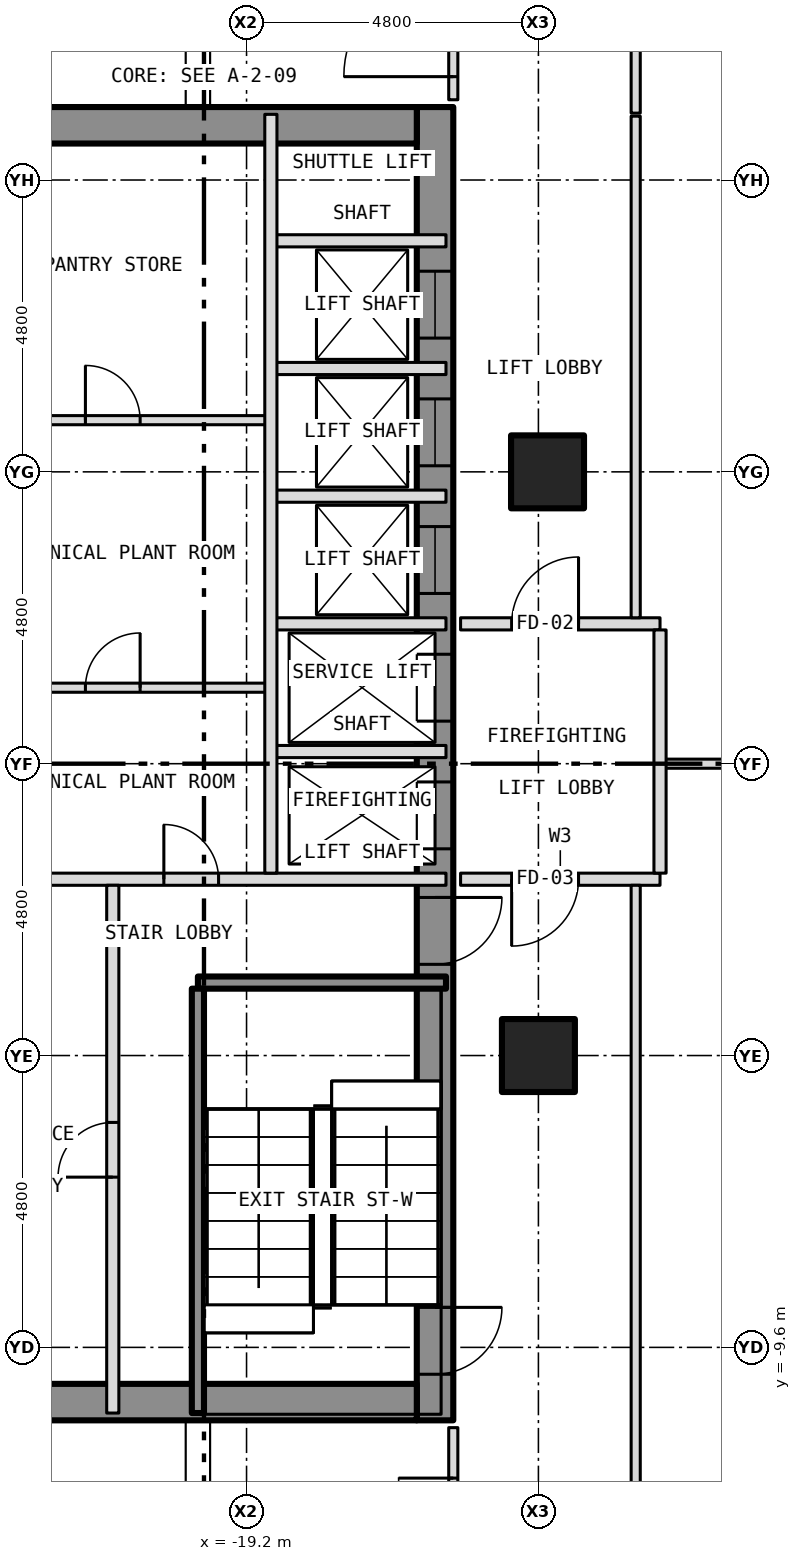
"""IFC4 building model, lengths in metres.
Left out: names, types, materials, properties, quantities, classifications, styles, units other than length and angle.
Written with IfcOpenShell. Run it as: python <this file> out.ifc"""

import sys

from ifc_helpers import new_model, si_unit, direction, frame, frame_2d, origin, origin_2d, place, context, subcontext, project, spatial, rectangle, hollow_rectangle, extrude, element, fill, save


model = new_model("IFC4")
c1 = context("Model", 3, precision=1e-05, world=origin(), true_north=direction((0.0, 1.0)))
c2 = subcontext(c1, "Body", "Model", "MODEL_VIEW")
j1 = project(units=[si_unit("LENGTHUNIT", "METRE"), si_unit("PLANEANGLEUNIT", "RADIAN")], contexts=[c1])
p1 = place(None, origin())
s1 = spatial("IfcSite", under=j1, at=p1, CompositionType="ELEMENT")
p2 = place(p1, origin())
s2 = spatial("IfcBuilding", under=s1, at=p2, CompositionType="ELEMENT")
p3 = place(p2, frame((0.0, 0.0, 33.5)))
s3 = spatial("IfcBuildingStorey", under=s2, at=p3, CompositionType="ELEMENT", Elevation=33.5)
for number, where, z_axis, x_axis in (
    (1, (-14.4, -4.8, -0.3), (0.0, 0.0, 1.0), (1.0, 0.0, 0.0)),
    (2, (-14.25, 4.8, -0.3), (0.0, 0.0, 1.0), (1.0, 0.0, 0.0)),
):
    element("IfcColumn", number, at=place(p3, frame(where, z_axis=z_axis, x_axis=x_axis)), inside=s3, PredefinedType="COLUMN", context=c2, shape_type="SweptSolid", body=[
        extrude(hollow_rectangle(XDim=1.2, YDim=1.2, WallThickness=0.07, at=origin_2d()), origin(), (0.0, 0.0, 1.0), 5.65),
    ])
p4 = place(p3, frame((-16.1, -10.8, 0.0), z_axis=(0.0, 0.0, 1.0), x_axis=(0.0, 1.0, 0.0)))
e3 = element("IfcWall", 3, at=p4, inside=s3, PredefinedType="SHEAR", context=c2, shape_type="SweptSolid", body=[
    extrude(rectangle(XDim=21.6, YDim=0.6, at=frame_2d((10.8, 0.0))), origin(), (0.0, 0.0, 1.0), 4.9),
])
p5 = place(p4, frame((9.4, 0.0, 0.0)))
e4 = element("IfcOpeningElement", 4, at=p5, cuts=e3, PredefinedType="OPENING", context=c2, shape_type="SweptSolid", body=[
    extrude(rectangle(XDim=1.1, YDim=2.1, at=frame_2d((0.55, 1.05))), frame((0.0, 0.312, 0.0), z_axis=(0.0, -1.0, 0.0), x_axis=(1.0, 0.0, 0.0)), (0.0, 0.0, 1.0), 0.624),
])
p6 = place(p4, frame((11.5, 0.0, 0.0)))
e5 = element("IfcOpeningElement", 5, at=p6, cuts=e3, PredefinedType="OPENING", context=c2, shape_type="SweptSolid", body=[
    extrude(rectangle(XDim=1.1, YDim=2.1, at=frame_2d((0.55, 1.05))), frame((0.0, 0.312, 0.0), z_axis=(0.0, -1.0, 0.0), x_axis=(1.0, 0.0, 0.0)), (0.0, 0.0, 1.0), 0.624),
])
p7 = place(p4, frame((13.6, 0.0, 0.0)))
e6 = element("IfcOpeningElement", 6, at=p7, cuts=e3, PredefinedType="OPENING", context=c2, shape_type="SweptSolid", body=[
    extrude(rectangle(XDim=1.1, YDim=2.1, at=frame_2d((0.55, 1.05))), frame((0.0, 0.312, 0.0), z_axis=(0.0, -1.0, 0.0), x_axis=(1.0, 0.0, 0.0)), (0.0, 0.0, 1.0), 0.624),
])
p8 = place(p4, frame((15.7, 0.0, 0.0)))
e7 = element("IfcOpeningElement", 7, at=p8, cuts=e3, PredefinedType="OPENING", context=c2, shape_type="SweptSolid", body=[
    extrude(rectangle(XDim=1.1, YDim=2.1, at=frame_2d((0.55, 1.05))), frame((0.0, 0.312, 0.0), z_axis=(0.0, -1.0, 0.0), x_axis=(1.0, 0.0, 0.0)), (0.0, 0.0, 1.0), 0.624),
])
p9 = place(p4, frame((17.8, 0.0, 0.0)))
e8 = element("IfcOpeningElement", 8, at=p9, cuts=e3, PredefinedType="OPENING", context=c2, shape_type="SweptSolid", body=[
    extrude(rectangle(XDim=1.1, YDim=2.1, at=frame_2d((0.55, 1.05))), frame((0.0, 0.312, 0.0), z_axis=(0.0, -1.0, 0.0), x_axis=(1.0, 0.0, 0.0)), (0.0, 0.0, 1.0), 0.624),
])
p10 = place(p4, frame((0.758, 0.0, 0.0)))
e9 = element("IfcOpeningElement", 9, at=p10, cuts=e3, PredefinedType="OPENING", context=c2, shape_type="SweptSolid", body=[
    extrude(rectangle(XDim=1.1, YDim=2.1, at=frame_2d((0.55, 1.05))), frame((0.0, 0.312, 0.0), z_axis=(0.0, -1.0, 0.0), x_axis=(1.0, 0.0, 0.0)), (0.0, 0.0, 1.0), 0.624),
])
p11 = place(p4, frame((7.5, 0.0, 0.0)))
e10 = element("IfcOpeningElement", 10, at=p11, cuts=e3, PredefinedType="OPENING", context=c2, shape_type="SweptSolid", body=[
    extrude(rectangle(XDim=1.1, YDim=2.1, at=frame_2d((0.55, 1.05))), frame((0.0, 0.312, 0.0), z_axis=(0.0, -1.0, 0.0), x_axis=(1.0, 0.0, 0.0)), (0.0, 0.0, 1.0), 0.624),
])
for number, where, z_axis, x_axis in (
    (11, (-23.4, 10.5, 0.0), (0.0, 0.0, 1.0), (1.0, 0.0, 0.0)),
    (12, (-23.4, -10.5, 0.0), (0.0, 0.0, 1.0), (1.0, 0.0, 0.0)),
):
    element("IfcWall", number, at=place(p3, frame(where, z_axis=z_axis, x_axis=x_axis)), inside=s3, PredefinedType="SHEAR", context=c2, shape_type="SweptSolid", body=[
        extrude(rectangle(XDim=7.0, YDim=0.6, at=frame_2d((3.5, 0.0))), origin(), (0.0, 0.0, 1.0), 4.9),
    ])
p12 = place(p3, frame((-20.0, -3.6, 0.0), z_axis=(0.0, 0.0, 1.0), x_axis=(1.0, 0.0, 0.0)))
e13 = element("IfcWall", 13, at=p12, inside=s3, PredefinedType="SHEAR", context=c2, shape_type="SweptSolid", body=[
    extrude(rectangle(XDim=4.08, YDim=0.2, at=frame_2d((2.04, 0.0))), origin(), (0.0, 0.0, 1.0), 4.9),
])
p13 = place(p3, frame((-23.88, -1.9, 0.0), z_axis=(0.0, 0.0, 1.0), x_axis=(1.0, 0.0, 0.0)))
e14 = element("IfcWall", 14, at=p13, inside=s3, PredefinedType="PARTITIONING", context=c2, shape_type="SweptSolid", body=[
    extrude(rectangle(XDim=7.96, YDim=0.2, at=frame_2d((3.98, 0.0))), origin(), (0.0, 0.0, 1.0), 4.9),
])
p14 = place(p13, frame((3.32, 0.0, 0.0)))
e15 = element("IfcOpeningElement", 15, at=p14, cuts=e14, PredefinedType="OPENING", context=c2, shape_type="SweptSolid", body=[
    extrude(rectangle(XDim=0.9, YDim=2.1, at=frame_2d((0.45, 1.05))), frame((0.0, 0.112, 0.0), z_axis=(0.0, -1.0, 0.0), x_axis=(1.0, 0.0, 0.0)), (0.0, 0.0, 1.0), 0.224),
])
p15 = place(p3, frame((-15.68, -1.9, 0.0), z_axis=(0.0, 0.0, 1.0), x_axis=(1.0, 0.0, 0.0)))
e16 = element("IfcWall", 16, at=p15, inside=s3, PredefinedType="PARTITIONING", context=c2, shape_type="SweptSolid", body=[
    extrude(rectangle(XDim=3.28, YDim=0.2, at=frame_2d((1.64, 0.0))), origin(), (0.0, 0.0, 1.0), 5.35),
])
p16 = place(p15, frame((0.84, 0.0, 0.0)))
e17 = element("IfcOpeningElement", 17, at=p16, cuts=e16, PredefinedType="OPENING", context=c2, shape_type="SweptSolid", body=[
    extrude(rectangle(XDim=1.1, YDim=2.1, at=frame_2d((0.55, 1.05))), frame((0.0, 0.112, 0.0), z_axis=(0.0, -1.0, 0.0), x_axis=(1.0, 0.0, 0.0)), (0.0, 0.0, 1.0), 0.224),
])
p17 = place(p3, frame((-12.4, 0.0, 0.0), z_axis=(0.0, 0.0, 1.0), x_axis=(1.0, 0.0, 0.0)))
e18 = element("IfcWall", 18, at=p17, inside=s3, PredefinedType="PARTITIONING", context=c2, shape_type="SweptSolid", body=[
    extrude(rectangle(XDim=7.446, YDim=0.15, at=frame_2d((3.723, 0.0))), origin(), (0.0, 0.0, 1.0), 4.359),
])
p18 = place(p3, frame((-18.8, 0.2, 0.0), z_axis=(0.0, 0.0, 1.0), x_axis=(1.0, 0.0, 0.0)))
e19 = element("IfcWall", 19, at=p18, inside=s3, PredefinedType="PARTITIONING", context=c2, shape_type="SweptSolid", body=[
    extrude(rectangle(XDim=2.88, YDim=0.2, at=frame_2d((1.44, 0.0))), origin(), (0.0, 0.0, 1.0), 4.9),
])
p19 = place(p3, frame((-23.88, 1.25, 0.0), z_axis=(0.0, 0.0, 1.0), x_axis=(1.0, 0.0, 0.0)))
e20 = element("IfcWall", 20, at=p19, inside=s3, PredefinedType="PARTITIONING", context=c2, shape_type="SweptSolid", body=[
    extrude(rectangle(XDim=5.08, YDim=0.15, at=frame_2d((2.54, 0.0))), origin(), (0.0, 0.0, 1.0), 4.9),
])
p20 = place(p19, frame((2.03, 0.0, 0.0)))
e21 = element("IfcOpeningElement", 21, at=p20, cuts=e20, PredefinedType="OPENING", context=c2, shape_type="SweptSolid", body=[
    extrude(rectangle(XDim=0.9, YDim=2.1, at=frame_2d((0.45, 1.05))), frame((0.0, 0.087, 0.0), z_axis=(0.0, -1.0, 0.0), x_axis=(1.0, 0.0, 0.0)), (0.0, 0.0, 1.0), 0.174),
])
p21 = place(p3, frame((-18.8, 2.3, 0.0), z_axis=(0.0, 0.0, 1.0), x_axis=(1.0, 0.0, 0.0)))
e22 = element("IfcWall", 22, at=p21, inside=s3, PredefinedType="PARTITIONING", context=c2, shape_type="SweptSolid", body=[
    extrude(rectangle(XDim=2.88, YDim=0.2, at=frame_2d((1.44, 0.0))), origin(), (0.0, 0.0, 1.0), 4.9),
])
p22 = place(p3, frame((-15.68, 2.3, 0.0), z_axis=(0.0, 0.0, 1.0), x_axis=(1.0, 0.0, 0.0)))
e23 = element("IfcWall", 23, at=p22, inside=s3, PredefinedType="PARTITIONING", context=c2, shape_type="SweptSolid", body=[
    extrude(rectangle(XDim=3.28, YDim=0.2, at=frame_2d((1.64, 0.0))), origin(), (0.0, 0.0, 1.0), 5.35),
])
p23 = place(p22, frame((0.84, 0.0, 0.0)))
e24 = element("IfcOpeningElement", 24, at=p23, cuts=e23, PredefinedType="OPENING", context=c2, shape_type="SweptSolid", body=[
    extrude(rectangle(XDim=1.1, YDim=2.1, at=frame_2d((0.55, 1.05))), frame((0.0, 0.112, 0.0), z_axis=(0.0, -1.0, 0.0), x_axis=(1.0, 0.0, 0.0)), (0.0, 0.0, 1.0), 0.224),
])
p24 = place(p3, frame((-18.8, 4.4, 0.0), z_axis=(0.0, 0.0, 1.0), x_axis=(1.0, 0.0, 0.0)))
e25 = element("IfcWall", 25, at=p24, inside=s3, PredefinedType="PARTITIONING", context=c2, shape_type="SweptSolid", body=[
    extrude(rectangle(XDim=2.88, YDim=0.2, at=frame_2d((1.44, 0.0))), origin(), (0.0, 0.0, 1.0), 4.9),
])
p25 = place(p3, frame((-23.88, 5.65, 0.0), z_axis=(0.0, 0.0, 1.0), x_axis=(1.0, 0.0, 0.0)))
e26 = element("IfcWall", 26, at=p25, inside=s3, PredefinedType="PARTITIONING", context=c2, shape_type="SweptSolid", body=[
    extrude(rectangle(XDim=5.08, YDim=0.15, at=frame_2d((2.54, 0.0))), origin(), (0.0, 0.0, 1.0), 4.9),
])
p26 = place(p25, frame((2.03, 0.0, 0.0)))
e27 = element("IfcOpeningElement", 27, at=p26, cuts=e26, PredefinedType="OPENING", context=c2, shape_type="SweptSolid", body=[
    extrude(rectangle(XDim=0.9, YDim=2.1, at=frame_2d((0.45, 1.05))), frame((0.0, 0.087, 0.0), z_axis=(0.0, -1.0, 0.0), x_axis=(1.0, 0.0, 0.0)), (0.0, 0.0, 1.0), 0.174),
])
for number, where, z_axis, x_axis in (
    (28, (-18.8, 6.5, 0.0), (0.0, 0.0, 1.0), (1.0, 0.0, 0.0)),
    (29, (-18.8, 8.6, 0.0), (0.0, 0.0, 1.0), (1.0, 0.0, 0.0)),
):
    element("IfcWall", number, at=place(p3, frame(where, z_axis=z_axis, x_axis=x_axis)), inside=s3, PredefinedType="PARTITIONING", context=c2, shape_type="SweptSolid", body=[
        extrude(rectangle(XDim=2.88, YDim=0.2, at=frame_2d((1.44, 0.0))), origin(), (0.0, 0.0, 1.0), 4.9),
    ])
p27 = place(p3, frame((-21.4, -10.68, 0.0), z_axis=(0.0, 0.0, 1.0), x_axis=(0.0, 1.0, 0.0)))
e30 = element("IfcWall", 30, at=p27, inside=s3, PredefinedType="PARTITIONING", context=c2, shape_type="SweptSolid", body=[
    extrude(rectangle(XDim=8.68, YDim=0.2, at=frame_2d((4.34, 0.0))), origin(), (0.0, 0.0, 1.0), 4.9),
])
p28 = place(p27, frame((3.88, 0.0, 0.0)))
e31 = element("IfcOpeningElement", 31, at=p28, cuts=e30, PredefinedType="OPENING", context=c2, shape_type="SweptSolid", body=[
    extrude(rectangle(XDim=0.9, YDim=2.1, at=frame_2d((0.45, 1.05))), frame((0.0, 0.112, 0.0), z_axis=(0.0, -1.0, 0.0), x_axis=(1.0, 0.0, 0.0)), (0.0, 0.0, 1.0), 0.224),
])
p29 = place(p3, frame((-20.0, -10.68, 0.0), z_axis=(0.0, 0.0, 1.0), x_axis=(0.0, 1.0, 0.0)))
e32 = element("IfcWall", 32, at=p29, inside=s3, PredefinedType="SHEAR", context=c2, shape_type="SweptSolid", body=[
    extrude(rectangle(XDim=6.98, YDim=0.2, at=frame_2d((3.49, 0.0))), origin(), (0.0, 0.0, 1.0), 4.9),
])
p30 = place(p3, frame((-18.8, -1.8, 0.0), z_axis=(0.0, 0.0, 1.0), x_axis=(0.0, 1.0, 0.0)))
e33 = element("IfcWall", 33, at=p30, inside=s3, PredefinedType="PARTITIONING", context=c2, shape_type="SweptSolid", body=[
    extrude(rectangle(XDim=12.48, YDim=0.2, at=frame_2d((6.24, 0.0))), origin(), (0.0, 0.0, 1.0), 4.9),
])
p31 = place(p3, frame((-15.8, -15.725, 0.0), z_axis=(0.0, 0.0, 1.0), x_axis=(0.0, 1.0, 0.0)))
e34 = element("IfcWall", 34, at=p31, inside=s3, PredefinedType="PARTITIONING", context=c2, shape_type="SweptSolid", body=[
    extrude(rectangle(XDim=4.805, YDim=0.15, at=frame_2d((2.403, 0.0))), origin(), (0.0, 0.0, 1.0), 5.35),
])
p32 = place(p31, frame((3.075, 0.0, 0.0)))
e35 = element("IfcOpeningElement", 35, at=p32, cuts=e34, PredefinedType="OPENING", context=c2, shape_type="SweptSolid", body=[
    extrude(rectangle(XDim=0.9, YDim=2.1, at=frame_2d((0.45, 1.05))), frame((0.0, 0.087, 0.0), z_axis=(0.0, -1.0, 0.0), x_axis=(1.0, 0.0, 0.0)), (0.0, 0.0, 1.0), 0.174),
])
p33 = place(p3, frame((-15.8, 10.92, 0.0), z_axis=(0.0, 0.0, 1.0), x_axis=(0.0, 1.0, 0.0)))
e36 = element("IfcWall", 36, at=p33, inside=s3, PredefinedType="PARTITIONING", context=c2, shape_type="SweptSolid", body=[
    extrude(rectangle(XDim=4.805, YDim=0.15, at=frame_2d((2.403, 0.0))), origin(), (0.0, 0.0, 1.0), 5.35),
])
p34 = place(p33, frame((0.38, 0.0, 0.0)))
e37 = element("IfcOpeningElement", 37, at=p34, cuts=e36, PredefinedType="OPENING", context=c2, shape_type="SweptSolid", body=[
    extrude(rectangle(XDim=1.8, YDim=2.1, at=frame_2d((0.9, 1.05))), frame((0.0, 0.087, 0.0), z_axis=(0.0, -1.0, 0.0), x_axis=(1.0, 0.0, 0.0)), (0.0, 0.0, 1.0), 0.174),
])
p35 = place(p3, frame((-12.8, -13.525, 0.0), z_axis=(0.0, 0.0, 1.0), x_axis=(0.0, 1.0, 0.0)))
e38 = element("IfcWall", 38, at=p35, inside=s3, PredefinedType="PARTITIONING", context=c2, shape_type="SweptSolid", body=[
    extrude(rectangle(XDim=11.525, YDim=0.15, at=frame_2d((5.762, 0.0))), origin(), (0.0, 0.0, 1.0), 5.35),
])
p36 = place(p3, frame((-12.8, 2.4, 0.0), z_axis=(0.0, 0.0, 1.0), x_axis=(0.0, 1.0, 0.0)))
e39 = element("IfcWall", 39, at=p36, inside=s3, PredefinedType="PARTITIONING", context=c2, shape_type="SweptSolid", body=[
    extrude(rectangle(XDim=8.25, YDim=0.15, at=frame_2d((4.125, 0.0))), origin(), (0.0, 0.0, 1.0), 5.35),
])
p37 = place(p3, frame((-12.8, 10.7, 0.0), z_axis=(0.0, 0.0, 1.0), x_axis=(0.0, 1.0, 0.0)))
e40 = element("IfcWall", 40, at=p37, inside=s3, PredefinedType="PARTITIONING", context=c2, shape_type="SweptSolid", body=[
    extrude(rectangle(XDim=2.825, YDim=0.15, at=frame_2d((1.413, 0.0))), origin(), (0.0, 0.0, 1.0), 5.35),
])
p38 = place(p3, frame((-12.4, -1.8, 0.0), z_axis=(0.0, 0.0, 1.0), x_axis=(0.0, 1.0, 0.0)))
e41 = element("IfcWall", 41, at=p38, inside=s3, PredefinedType="PARTITIONING", context=c2, shape_type="SweptSolid", body=[
    extrude(rectangle(XDim=4.0, YDim=0.2, at=frame_2d((2.0, 0.0))), origin(), (0.0, 0.0, 1.0), 5.35),
])
p39 = place(p5, origin())
e42 = element("IfcDoor", 42, at=p39, inside=s3, OperationType="SLIDING_TO_LEFT", PredefinedType="DOOR", context=c2, shape_type="SweptSolid", body=[
    extrude(rectangle(XDim=1.1, YDim=2.1, at=frame_2d((0.55, 1.05))), frame((0.0, 0.025, 0.0), z_axis=(0.0, -1.0, 0.0), x_axis=(1.0, 0.0, 0.0)), (0.0, 0.0, 1.0), 0.05),
])
fill(e4, e42)
p40 = place(p6, origin())
e43 = element("IfcDoor", 43, at=p40, inside=s3, OperationType="SLIDING_TO_LEFT", PredefinedType="DOOR", context=c2, shape_type="SweptSolid", body=[
    extrude(rectangle(XDim=1.1, YDim=2.1, at=frame_2d((0.55, 1.05))), frame((0.0, 0.025, 0.0), z_axis=(0.0, -1.0, 0.0), x_axis=(1.0, 0.0, 0.0)), (0.0, 0.0, 1.0), 0.05),
])
fill(e5, e43)
p41 = place(p7, origin())
e44 = element("IfcDoor", 44, at=p41, inside=s3, OperationType="SLIDING_TO_LEFT", PredefinedType="DOOR", context=c2, shape_type="SweptSolid", body=[
    extrude(rectangle(XDim=1.1, YDim=2.1, at=frame_2d((0.55, 1.05))), frame((0.0, 0.025, 0.0), z_axis=(0.0, -1.0, 0.0), x_axis=(1.0, 0.0, 0.0)), (0.0, 0.0, 1.0), 0.05),
])
fill(e6, e44)
p42 = place(p8, origin())
e45 = element("IfcDoor", 45, at=p42, inside=s3, OperationType="SLIDING_TO_LEFT", PredefinedType="DOOR", context=c2, shape_type="SweptSolid", body=[
    extrude(rectangle(XDim=1.1, YDim=2.1, at=frame_2d((0.55, 1.05))), frame((0.0, 0.025, 0.0), z_axis=(0.0, -1.0, 0.0), x_axis=(1.0, 0.0, 0.0)), (0.0, 0.0, 1.0), 0.05),
])
fill(e7, e45)
p43 = place(p9, origin())
e46 = element("IfcDoor", 46, at=p43, inside=s3, OperationType="SLIDING_TO_LEFT", PredefinedType="DOOR", context=c2, shape_type="SweptSolid", body=[
    extrude(rectangle(XDim=1.1, YDim=2.1, at=frame_2d((0.55, 1.05))), frame((0.0, 0.025, 0.0), z_axis=(0.0, -1.0, 0.0), x_axis=(1.0, 0.0, 0.0)), (0.0, 0.0, 1.0), 0.05),
])
fill(e8, e46)
p44 = place(p10, origin())
e47 = element("IfcDoor", 47, at=p44, inside=s3, OperationType="SINGLE_SWING_RIGHT", PredefinedType="DOOR", context=c2, shape_type="SweptSolid", body=[
    extrude(rectangle(XDim=1.1, YDim=2.1, at=frame_2d((0.55, 1.05))), frame((0.0, 0.025, 0.0), z_axis=(0.0, -1.0, 0.0), x_axis=(1.0, 0.0, 0.0)), (0.0, 0.0, 1.0), 0.05),
])
fill(e9, e47)
p45 = place(p11, origin())
e48 = element("IfcDoor", 48, at=p45, inside=s3, OperationType="SINGLE_SWING_RIGHT", PredefinedType="DOOR", context=c2, shape_type="SweptSolid", body=[
    extrude(rectangle(XDim=1.1, YDim=2.1, at=frame_2d((0.55, 1.05))), frame((0.0, 0.025, 0.0), z_axis=(0.0, -1.0, 0.0), x_axis=(1.0, 0.0, 0.0)), (0.0, 0.0, 1.0), 0.05),
])
fill(e10, e48)
p46 = place(p28, origin())
e49 = element("IfcDoor", 49, at=p46, inside=s3, OperationType="SINGLE_SWING_LEFT", PredefinedType="DOOR", context=c2, shape_type="SweptSolid", body=[
    extrude(rectangle(XDim=0.9, YDim=2.1, at=frame_2d((0.45, 1.05))), frame((0.0, 0.025, 0.0), z_axis=(0.0, -1.0, 0.0), x_axis=(1.0, 0.0, 0.0)), (0.0, 0.0, 1.0), 0.05),
])
fill(e31, e49)
p47 = place(p14, origin())
e50 = element("IfcDoor", 50, at=p47, inside=s3, OperationType="SINGLE_SWING_LEFT", PredefinedType="DOOR", context=c2, shape_type="SweptSolid", body=[
    extrude(rectangle(XDim=0.9, YDim=2.1, at=frame_2d((0.45, 1.05))), frame((0.0, 0.025, 0.0), z_axis=(0.0, -1.0, 0.0), x_axis=(1.0, 0.0, 0.0)), (0.0, 0.0, 1.0), 0.05),
])
fill(e15, e50)
p48 = place(p20, origin())
e51 = element("IfcDoor", 51, at=p48, inside=s3, OperationType="SINGLE_SWING_RIGHT", PredefinedType="DOOR", context=c2, shape_type="SweptSolid", body=[
    extrude(rectangle(XDim=0.9, YDim=2.1, at=frame_2d((0.45, 1.05))), frame((0.0, 0.025, 0.0), z_axis=(0.0, -1.0, 0.0), x_axis=(1.0, 0.0, 0.0)), (0.0, 0.0, 1.0), 0.05),
])
fill(e21, e51)
p49 = place(p26, origin())
e52 = element("IfcDoor", 52, at=p49, inside=s3, OperationType="SINGLE_SWING_LEFT", PredefinedType="DOOR", context=c2, shape_type="SweptSolid", body=[
    extrude(rectangle(XDim=0.9, YDim=2.1, at=frame_2d((0.45, 1.05))), frame((0.0, 0.025, 0.0), z_axis=(0.0, -1.0, 0.0), x_axis=(1.0, 0.0, 0.0)), (0.0, 0.0, 1.0), 0.05),
])
fill(e27, e52)
p50 = place(p23, origin())
e53 = element("IfcDoor", 53, at=p50, inside=s3, OperationType="SINGLE_SWING_RIGHT", PredefinedType="DOOR", context=c2, shape_type="SweptSolid", body=[
    extrude(rectangle(XDim=1.1, YDim=2.1, at=frame_2d((0.55, 1.05))), frame((0.0, 0.025, 0.0), z_axis=(0.0, -1.0, 0.0), x_axis=(1.0, 0.0, 0.0)), (0.0, 0.0, 1.0), 0.05),
])
fill(e24, e53)
p51 = place(p16, origin())
e54 = element("IfcDoor", 54, at=p51, inside=s3, OperationType="SINGLE_SWING_LEFT", PredefinedType="DOOR", context=c2, shape_type="SweptSolid", body=[
    extrude(rectangle(XDim=1.1, YDim=2.1, at=frame_2d((0.55, 1.05))), frame((0.0, 0.025, 0.0), z_axis=(0.0, -1.0, 0.0), x_axis=(1.0, 0.0, 0.0)), (0.0, 0.0, 1.0), 0.05),
])
fill(e17, e54)
p52 = place(p32, origin())
e55 = element("IfcDoor", 55, at=p52, inside=s3, OperationType="SINGLE_SWING_RIGHT", PredefinedType="DOOR", context=c2, shape_type="SweptSolid", body=[
    extrude(rectangle(XDim=0.9, YDim=2.1, at=frame_2d((0.45, 1.05))), frame((0.0, 0.025, 0.0), z_axis=(0.0, -1.0, 0.0), x_axis=(1.0, 0.0, 0.0)), (0.0, 0.0, 1.0), 0.05),
])
fill(e35, e55)
p53 = place(p34, origin())
e56 = element("IfcDoor", 56, at=p53, inside=s3, OperationType="DOUBLE_DOOR_SINGLE_SWING", PredefinedType="DOOR", context=c2, shape_type="SweptSolid", body=[
    extrude(rectangle(XDim=1.8, YDim=2.1, at=frame_2d((0.9, 1.05))), frame((0.0, 0.025, 0.0), z_axis=(0.0, -1.0, 0.0), x_axis=(1.0, 0.0, 0.0)), (0.0, 0.0, 1.0), 0.05),
])
fill(e37, e56)
save(model, sys.argv[1])
